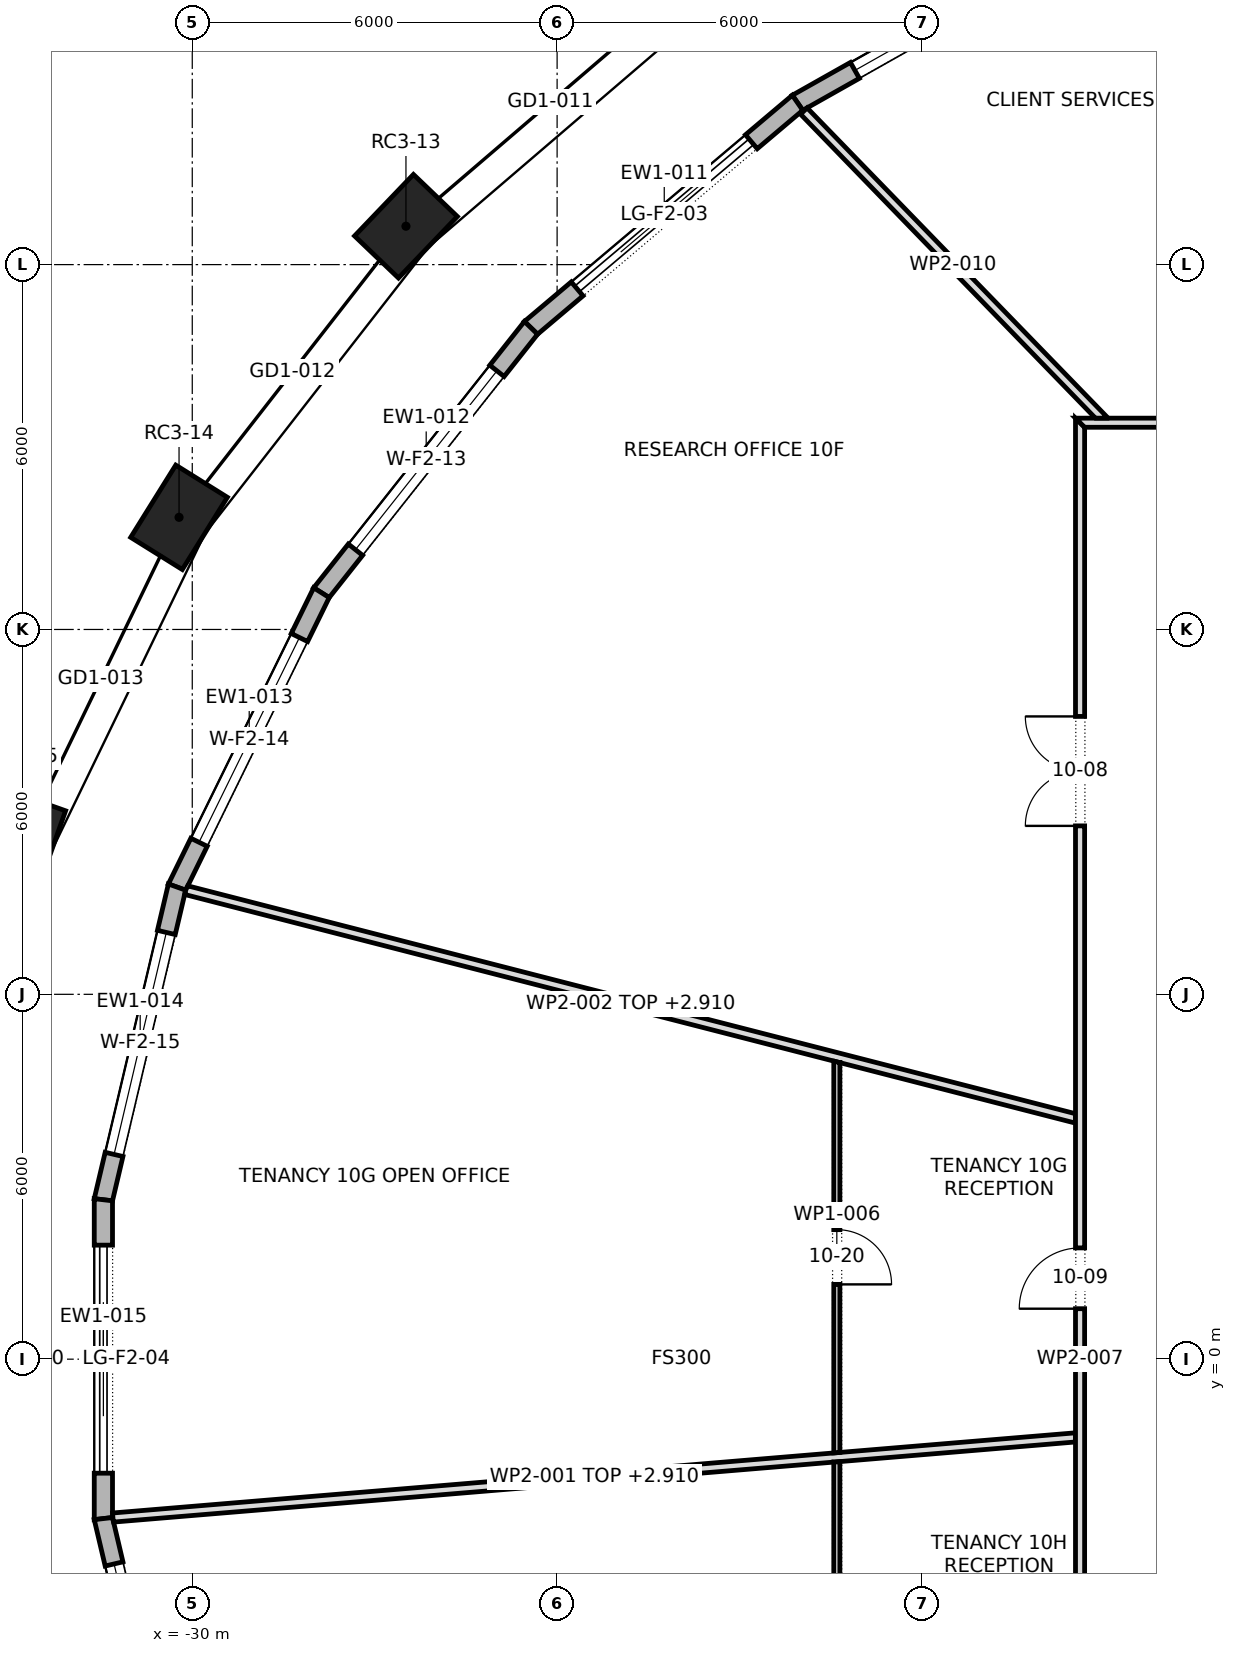
"""IFC4 building model, lengths in metres.
Left out: names, types, materials, properties, quantities, classifications, styles, units other than length and angle.
Written with IfcOpenShell. Run it as: python <this file> out.ifc"""

import sys

from ifc_helpers import new_model, si_unit, direction, frame, frame_2d, origin, origin_2d, place, context, subcontext, project, spatial, polyline, rectangle, outline, extrude, element, fill, save


model = new_model("IFC4")
c1 = context("Model", 3, precision=1e-05, world=origin(), true_north=direction((0.0, 1.0)))
c2 = subcontext(c1, "Body", "Model", "MODEL_VIEW")
j1 = project(units=[si_unit("LENGTHUNIT", "METRE"), si_unit("PLANEANGLEUNIT", "RADIAN")], contexts=[c1])
p1 = place(None, origin())
s1 = spatial("IfcSite", under=j1, at=p1, CompositionType="ELEMENT")
p2 = place(p1, origin())
s2 = spatial("IfcBuilding", under=s1, at=p2, CompositionType="ELEMENT")
p3 = place(p2, frame((0.0, 0.0, 142.3)))
s3 = spatial("IfcBuildingStorey", under=s2, at=p3, CompositionType="ELEMENT", Elevation=142.3)
for number, where, z_axis, x_axis in (
    (1, (-26.486, 18.631, 0.0), (0.0, 0.0, 1.0), (-0.692, -0.722, 0.0)),
    (2, (-30.217, 13.844, 0.0), (0.0, 0.0, 1.0), (-0.529, -0.849, 0.0)),
    (3, (-32.788, 8.525, 0.0), (0.0, 0.0, 1.0), (-0.334, -0.943, 0.0)),
):
    element("IfcColumn", number, at=place(p3, frame(where, z_axis=z_axis, x_axis=x_axis)), inside=s3, PredefinedType="COLUMN", context=c2, shape_type="SweptSolid", body=[
        extrude(rectangle(XDim=1.4, YDim=1.0, at=origin_2d()), origin(), (0.0, 0.0, 1.0), 4.2),
    ])
p4 = place(p3, frame((-14.894, 23.569, 0.0), z_axis=(0.0, 0.0, 1.0), x_axis=(-0.870912346166, -0.491438384028, 0.0)))
e4 = element("IfcWall", 4, at=p4, inside=s3, PredefinedType="STANDARD", context=c2, shape_type="SweptSolid", body=[
    extrude(outline(polyline([(-0.013, -0.15), (5.93, -0.15), (5.902, 0.15), (0.013, 0.15), (-0.013, -0.15)])), origin(), (0.0, 0.0, 1.0), 3.9),
])
p5 = place(p4, frame((1.083, 0.0, 0.6)))
e5 = element("IfcOpeningElement", 5, at=p5, cuts=e4, PredefinedType="OPENING", context=c2, shape_type="SweptSolid", body=[
    extrude(rectangle(XDim=3.75, YDim=2.85, at=frame_2d((1.875, 1.425))), frame((0.0, 0.162, 0.0), z_axis=(0.0, -1.0, 0.0), x_axis=(1.0, 0.0, 0.0)), (0.0, 0.0, 1.0), 0.324),
])
p6 = place(p3, frame((-20.046, 20.661, 0.0), z_axis=(0.0, 0.0, 1.0), x_axis=(-0.764047627809, -0.64515984255, 0.0)))
e6 = element("IfcWall", 6, at=p6, inside=s3, PredefinedType="STANDARD", context=c2, shape_type="SweptSolid", body=[
    extrude(outline(polyline([(-0.014, -0.15), (5.753, -0.15), (5.722, 0.15), (0.014, 0.15), (-0.014, -0.15)])), origin(), (0.0, 0.0, 1.0), 3.9),
])
p7 = place(p6, frame((0.994, 0.0, 0.0)))
e7 = element("IfcOpeningElement", 7, at=p7, cuts=e6, PredefinedType="OPENING", context=c2, shape_type="SweptSolid", body=[
    extrude(rectangle(XDim=3.75, YDim=3.45, at=frame_2d((1.875, 1.725))), frame((0.0, 0.162, 0.0), z_axis=(0.0, -1.0, 0.0), x_axis=(1.0, 0.0, 0.0)), (0.0, 0.0, 1.0), 0.324),
])
p8 = place(p3, frame((-24.43, 16.96, 0.0), z_axis=(0.0, 0.0, 1.0), x_axis=(-0.620520511988, -0.784190215574, 0.0)))
e8 = element("IfcWall", 8, at=p8, inside=s3, PredefinedType="STANDARD", context=c2, shape_type="SweptSolid", body=[
    extrude(outline(polyline([(-0.015, -0.15), (5.57, -0.15), (5.537, 0.15), (0.015, 0.15), (-0.015, -0.15)])), origin(), (0.0, 0.0, 1.0), 3.9),
])
p9 = place(p8, frame((0.902, 0.0, 0.6)))
e9 = element("IfcOpeningElement", 9, at=p9, cuts=e8, PredefinedType="OPENING", context=c2, shape_type="SweptSolid", body=[
    extrude(rectangle(XDim=3.75, YDim=2.85, at=frame_2d((1.875, 1.425))), frame((0.0, 0.162, 0.0), z_axis=(0.0, -1.0, 0.0), x_axis=(1.0, 0.0, 0.0)), (0.0, 0.0, 1.0), 0.324),
])
p10 = place(p3, frame((-27.876, 12.605, 0.0), z_axis=(0.0, 0.0, 1.0), x_axis=(-0.440373354088, -0.897814740918, 0.0)))
e10 = element("IfcWall", 10, at=p10, inside=s3, PredefinedType="STANDARD", context=c2, shape_type="SweptSolid", body=[
    extrude(outline(polyline([(-0.016, -0.15), (5.409, -0.15), (5.376, 0.15), (0.016, 0.15), (-0.016, -0.15)])), origin(), (0.0, 0.0, 1.0), 3.9),
])
p11 = place(p10, frame((0.821, 0.0, 0.6)))
e11 = element("IfcOpeningElement", 11, at=p11, cuts=e10, PredefinedType="OPENING", context=c2, shape_type="SweptSolid", body=[
    extrude(rectangle(XDim=3.75, YDim=2.85, at=frame_2d((1.875, 1.425))), frame((0.0, 0.162, 0.0), z_axis=(0.0, -1.0, 0.0), x_axis=(1.0, 0.0, 0.0)), (0.0, 0.0, 1.0), 0.324),
])
p12 = place(p3, frame((-30.25, 7.763, 0.0), z_axis=(0.0, 0.0, 1.0), x_axis=(-0.229289208312, -0.973358340464, 0.0)))
e12 = element("IfcWall", 12, at=p12, inside=s3, PredefinedType="STANDARD", context=c2, shape_type="SweptSolid", body=[
    extrude(outline(polyline([(-0.017, -0.15), (5.3, -0.15), (5.265, 0.15), (0.017, 0.15), (-0.017, -0.15)])), origin(), (0.0, 0.0, 1.0), 3.9),
])
p13 = place(p12, frame((0.766, 0.0, 0.6)))
e13 = element("IfcOpeningElement", 13, at=p13, cuts=e12, PredefinedType="OPENING", context=c2, shape_type="SweptSolid", body=[
    extrude(rectangle(XDim=3.75, YDim=2.85, at=frame_2d((1.875, 1.425))), frame((0.0, 0.162, 0.0), z_axis=(0.0, -1.0, 0.0), x_axis=(1.0, 0.0, 0.0)), (0.0, 0.0, 1.0), 0.324),
])
p14 = place(p3, frame((-31.462, 2.622, 0.0), z_axis=(0.0, 0.0, 1.0), x_axis=(0.0, -1.0, 0.0)))
e14 = element("IfcWall", 14, at=p14, inside=s3, PredefinedType="STANDARD", context=c2, shape_type="SweptSolid", body=[
    extrude(outline(polyline([(-0.017, -0.15), (5.26, -0.15), (5.226, 0.15), (0.017, 0.15), (-0.017, -0.15)])), origin(), (0.0, 0.0, 1.0), 3.9),
])
p15 = place(p14, frame((0.747, 0.0, 0.0)))
e15 = element("IfcOpeningElement", 15, at=p15, cuts=e14, PredefinedType="OPENING", context=c2, shape_type="SweptSolid", body=[
    extrude(rectangle(XDim=3.75, YDim=3.45, at=frame_2d((1.875, 1.725))), frame((0.0, 0.162, 0.0), z_axis=(0.0, -1.0, 0.0), x_axis=(1.0, 0.0, 0.0)), (0.0, 0.0, 1.0), 0.324),
])
p16 = place(p3, frame((-31.462, -2.622, 0.0), z_axis=(0.0, 0.0, 1.0), x_axis=(0.229289208312, -0.973358340464, 0.0)))
e16 = element("IfcWall", 16, at=p16, inside=s3, PredefinedType="STANDARD", context=c2, shape_type="SweptSolid", body=[
    extrude(outline(polyline([(-0.017, -0.15), (5.299, -0.15), (5.265, 0.15), (0.017, 0.15), (-0.017, -0.15)])), origin(), (0.0, 0.0, 1.0), 3.9),
])
p17 = place(p16, frame((0.766, 0.0, 0.6)))
e17 = element("IfcOpeningElement", 17, at=p17, cuts=e16, PredefinedType="OPENING", context=c2, shape_type="SweptSolid", body=[
    extrude(rectangle(XDim=3.75, YDim=2.85, at=frame_2d((1.875, 1.425))), frame((0.0, 0.162, 0.0), z_axis=(0.0, -1.0, 0.0), x_axis=(1.0, 0.0, 0.0)), (0.0, 0.0, 1.0), 0.324),
])
p18 = place(p3, frame((-31.305, -2.604, 0.0), z_axis=(0.0, 0.0, 1.0), x_axis=(0.996551160003, 0.082980633261, 0.0)))
e18 = element("IfcWall", 18, at=p18, inside=s3, PredefinedType="PARTITIONING", context=c2, shape_type="SweptSolid", body=[
    extrude(outline(polyline([(0.005, -0.075), (1.985, -0.075), (3.966, -0.075), (5.947, -0.075), (7.928, -0.075), (9.909, -0.075), (11.89, -0.075), (11.89, -0.075), (11.891, -0.075), (13.885, -0.075), (15.878, -0.075), (15.89, 0.068), (15.89, 0.075), (13.904, 0.075), (11.918, 0.075), (9.931, 0.075), (7.945, 0.075), (5.959, 0.075), (3.973, 0.075), (1.986, 0.075), (0.0, 0.075), (0.0, -0.044), (0.005, -0.075)])), origin(), (0.0, 0.0, 1.0), 2.91),
])
p19 = place(p3, frame((-30.106, 7.715, 0.0), z_axis=(0.0, 0.0, 1.0), x_axis=(0.968604188178, -0.248607977837, 0.0)))
e19 = element("IfcWall", 19, at=p19, inside=s3, PredefinedType="PARTITIONING", context=c2, shape_type="SweptSolid", body=[
    extrude(outline(polyline([(0.0, -0.075), (1.853, -0.075), (3.707, -0.075), (5.56, -0.075), (7.413, -0.075), (9.267, -0.075), (11.12, -0.075), (11.124, -0.074), (11.124, -0.075), (12.458, -0.075), (13.791, -0.075), (15.124, -0.075), (15.124, -0.073), (15.086, 0.075), (13.202, 0.075), (11.318, 0.075), (9.434, 0.075), (7.55, 0.075), (5.667, 0.075), (3.782, 0.075), (1.898, 0.075), (0.015, 0.075), (0.0, 0.005), (0.0, -0.075)])), origin(), (0.0, 0.0, 1.0), 2.91),
])
p20 = place(p3, frame((-19.4, -13.387, 0.0), z_axis=(0.0, 0.0, 1.0), x_axis=(0.0, 1.0, 0.0)))
e20 = element("IfcWall", 20, at=p20, inside=s3, PredefinedType="PARTITIONING", context=c2, shape_type="SweptSolid", body=[
    extrude(outline(polyline([(11.703, -0.05), (11.703, -0.046), (11.695, 0.05), (10.028, 0.05), (8.361, 0.05), (8.354, 0.048), (8.353, 0.05), (6.682, 0.05), (5.012, 0.05), (3.341, 0.05), (1.671, 0.05), (0.0, 0.05), (0.0, 0.05), (0.069, -0.05), (2.008, -0.05), (3.947, -0.05), (5.886, -0.05), (7.825, -0.05), (9.764, -0.05), (11.703, -0.05)])), origin(), (0.0, 0.0, 1.0), 3.9),
])
p21 = place(p20, frame((3.732, 0.0, 0.0)))
e21 = element("IfcOpeningElement", 21, at=p21, cuts=e20, PredefinedType="OPENING", context=c2, shape_type="SweptSolid", body=[
    extrude(rectangle(XDim=0.9, YDim=2.1, at=frame_2d((0.45, 1.05))), frame((0.0, 0.062, 0.0), z_axis=(0.0, -1.0, 0.0), x_axis=(1.0, 0.0, 0.0)), (0.0, 0.0, 1.0), 0.124),
])
p22 = place(p3, frame((-19.4, -1.542, 0.0), z_axis=(0.0, 0.0, 1.0), x_axis=(0.0, 1.0, 0.0)))
e22 = element("IfcWall", 22, at=p22, inside=s3, PredefinedType="PARTITIONING", context=c2, shape_type="SweptSolid", body=[
    extrude(outline(polyline([(0.008, -0.05), (1.611, -0.05), (3.213, -0.05), (4.816, -0.05), (6.418, -0.05), (6.444, 0.05), (4.833, 0.05), (3.222, 0.05), (1.611, 0.05), (0.0, 0.05), (0.0, 0.05), (0.008, -0.05)])), origin(), (0.0, 0.0, 1.0), 3.9),
])
p23 = place(p22, frame((2.772, 0.0, 0.0)))
e23 = element("IfcOpeningElement", 23, at=p23, cuts=e22, PredefinedType="OPENING", context=c2, shape_type="SweptSolid", body=[
    extrude(rectangle(XDim=0.9, YDim=2.1, at=frame_2d((0.45, 1.05))), frame((0.0, 0.062, 0.0), z_axis=(0.0, -1.0, 0.0), x_axis=(1.0, 0.0, 0.0)), (0.0, 0.0, 1.0), 0.124),
])
p24 = place(p3, frame((-15.4, -15.475, 0.0), z_axis=(0.0, 0.0, 1.0), x_axis=(0.0, 1.0, 0.0)))
e24 = element("IfcWall", 24, at=p24, inside=s3, PredefinedType="PARTITIONING", context=c2, shape_type="SweptSolid", body=[
    extrude(outline(polyline([(0.15, -0.075), (2.066, -0.075), (3.981, -0.075), (5.897, -0.075), (7.812, -0.075), (9.728, -0.075), (11.644, -0.075), (13.56, -0.075), (15.475, -0.075), (17.391, -0.075), (19.306, -0.075), (21.222, -0.075), (23.138, -0.075), (25.053, -0.075), (26.969, -0.075), (28.885, -0.075), (30.8, -0.075), (30.95, 0.075), (29.016, 0.075), (27.081, 0.075), (25.147, 0.075), (23.212, 0.075), (21.278, 0.075), (19.344, 0.075), (17.409, 0.075), (15.475, 0.075), (13.541, 0.075), (11.606, 0.075), (9.672, 0.075), (7.738, 0.075), (5.803, 0.075), (3.869, 0.075), (1.935, 0.075), (0.0, 0.075), (0.15, -0.075)])), origin(), (0.0, 0.0, 1.0), 3.9),
])
p25 = place(p24, frame((24.245, 0.0, 0.0)))
e25 = element("IfcOpeningElement", 25, at=p25, cuts=e24, PredefinedType="OPENING", context=c2, shape_type="SweptSolid", body=[
    extrude(rectangle(XDim=1.8, YDim=2.1, at=frame_2d((0.9, 1.05))), frame((0.0, 0.087, 0.0), z_axis=(0.0, -1.0, 0.0), x_axis=(1.0, 0.0, 0.0)), (0.0, 0.0, 1.0), 0.174),
])
p26 = place(p24, frame((16.305, 0.0, 0.0)))
e26 = element("IfcOpeningElement", 26, at=p26, cuts=e24, PredefinedType="OPENING", context=c2, shape_type="SweptSolid", body=[
    extrude(rectangle(XDim=1.0, YDim=2.1, at=frame_2d((0.5, 1.05))), frame((0.0, 0.087, 0.0), z_axis=(0.0, -1.0, 0.0), x_axis=(1.0, 0.0, 0.0)), (0.0, 0.0, 1.0), 0.174),
])
p27 = place(p24, frame((9.0, 0.0, 0.0)))
e27 = element("IfcOpeningElement", 27, at=p27, cuts=e24, PredefinedType="OPENING", context=c2, shape_type="SweptSolid", body=[
    extrude(rectangle(XDim=1.0, YDim=2.1, at=frame_2d((0.5, 1.05))), frame((0.0, 0.087, 0.0), z_axis=(0.0, -1.0, 0.0), x_axis=(1.0, 0.0, 0.0)), (0.0, 0.0, 1.0), 0.174),
])
p28 = place(p3, frame((-15.475, 15.4, 0.0), z_axis=(0.0, 0.0, 1.0), x_axis=(1.0, 0.0, 0.0)))
e28 = element("IfcWall", 28, at=p28, inside=s3, PredefinedType="PARTITIONING", context=c2, shape_type="SweptSolid", body=[
    extrude(outline(polyline([(0.15, -0.075), (2.066, -0.075), (3.981, -0.075), (5.897, -0.075), (7.812, -0.075), (9.728, -0.075), (11.644, -0.075), (13.56, -0.075), (15.475, -0.075), (17.391, -0.075), (19.306, -0.075), (21.222, -0.075), (23.138, -0.075), (25.053, -0.075), (26.969, -0.075), (28.885, -0.075), (30.8, -0.075), (30.95, 0.075), (29.016, 0.075), (27.081, 0.075), (25.147, 0.075), (23.212, 0.075), (21.278, 0.075), (19.344, 0.075), (17.409, 0.075), (15.475, 0.075), (13.541, 0.075), (11.606, 0.075), (9.672, 0.075), (7.738, 0.075), (5.803, 0.075), (3.869, 0.075), (1.935, 0.075), (0.0, 0.075), (0.15, -0.075)])), origin(), (0.0, 0.0, 1.0), 3.9),
])
p29 = place(p28, frame((27.55, 0.0, 0.0)))
e29 = element("IfcOpeningElement", 29, at=p29, cuts=e28, PredefinedType="OPENING", context=c2, shape_type="SweptSolid", body=[
    extrude(rectangle(XDim=1.0, YDim=2.1, at=frame_2d((0.5, 1.05))), frame((0.0, 0.087, 0.0), z_axis=(0.0, -1.0, 0.0), x_axis=(1.0, 0.0, 0.0)), (0.0, 0.0, 1.0), 0.174),
])
p30 = place(p28, frame((20.75, 0.0, 0.0)))
e30 = element("IfcOpeningElement", 30, at=p30, cuts=e28, PredefinedType="OPENING", context=c2, shape_type="SweptSolid", body=[
    extrude(rectangle(XDim=1.0, YDim=2.1, at=frame_2d((0.5, 1.05))), frame((0.0, 0.087, 0.0), z_axis=(0.0, -1.0, 0.0), x_axis=(1.0, 0.0, 0.0)), (0.0, 0.0, 1.0), 0.174),
])
p31 = place(p28, frame((13.11, 0.0, 0.0)))
e31 = element("IfcOpeningElement", 31, at=p31, cuts=e28, PredefinedType="OPENING", context=c2, shape_type="SweptSolid", body=[
    extrude(rectangle(XDim=1.0, YDim=2.1, at=frame_2d((0.5, 1.05))), frame((0.0, 0.087, 0.0), z_axis=(0.0, -1.0, 0.0), x_axis=(1.0, 0.0, 0.0)), (0.0, 0.0, 1.0), 0.174),
])
p32 = place(p28, frame((4.725, 0.0, 0.0)))
e32 = element("IfcOpeningElement", 32, at=p32, cuts=e28, PredefinedType="OPENING", context=c2, shape_type="SweptSolid", body=[
    extrude(rectangle(XDim=1.0, YDim=2.1, at=frame_2d((0.5, 1.05))), frame((0.0, 0.087, 0.0), z_axis=(0.0, -1.0, 0.0), x_axis=(1.0, 0.0, 0.0)), (0.0, 0.0, 1.0), 0.174),
])
p33 = place(p3, frame((-14.992, 15.423, 0.0), z_axis=(0.0, 0.0, 1.0), x_axis=(-0.696328171708, 0.717723538199, 0.0)))
e33 = element("IfcWall", 33, at=p33, inside=s3, PredefinedType="PARTITIONING", context=c2, shape_type="SweptSolid", body=[
    extrude(outline(polyline([(7.109, 0.075), (5.368, 0.075), (3.627, 0.075), (1.886, 0.075), (0.145, 0.075), (0.0, -0.074), (0.0, -0.075), (1.777, -0.075), (3.554, -0.075), (5.332, -0.075), (7.109, -0.075), (7.109, 0.075)])), origin(), (0.0, 0.0, 1.0), 3.9),
])
p34 = place(p5, origin())
e34 = element("IfcWindow", 34, at=p34, inside=s3, PartitioningType="TRIPLE_PANEL_VERTICAL", PredefinedType="WINDOW", context=c2, shape_type="SweptSolid", body=[
    extrude(rectangle(XDim=3.75, YDim=2.85, at=frame_2d((1.875, 1.425))), frame((0.0, 0.03, 0.0), z_axis=(0.0, -1.0, 0.0), x_axis=(1.0, 0.0, 0.0)), (0.0, 0.0, 1.0), 0.06),
])
fill(e5, e34)
p35 = place(p7, origin())
e35 = element("IfcDoor", 35, at=p35, inside=s3, OperationType="DOUBLE_DOOR_SLIDING", PredefinedType="DOOR", context=c2, shape_type="SweptSolid", body=[
    extrude(rectangle(XDim=3.75, YDim=3.45, at=frame_2d((1.875, 1.725))), frame((0.0, 0.025, 0.0), z_axis=(0.0, -1.0, 0.0), x_axis=(1.0, 0.0, 0.0)), (0.0, 0.0, 1.0), 0.05),
])
fill(e7, e35)
p36 = place(p9, origin())
e36 = element("IfcWindow", 36, at=p36, inside=s3, PartitioningType="TRIPLE_PANEL_VERTICAL", PredefinedType="WINDOW", context=c2, shape_type="SweptSolid", body=[
    extrude(rectangle(XDim=3.75, YDim=2.85, at=frame_2d((1.875, 1.425))), frame((0.0, 0.03, 0.0), z_axis=(0.0, -1.0, 0.0), x_axis=(1.0, 0.0, 0.0)), (0.0, 0.0, 1.0), 0.06),
])
fill(e9, e36)
p37 = place(p11, origin())
e37 = element("IfcWindow", 37, at=p37, inside=s3, PartitioningType="TRIPLE_PANEL_VERTICAL", PredefinedType="WINDOW", context=c2, shape_type="SweptSolid", body=[
    extrude(rectangle(XDim=3.75, YDim=2.85, at=frame_2d((1.875, 1.425))), frame((0.0, 0.03, 0.0), z_axis=(0.0, -1.0, 0.0), x_axis=(1.0, 0.0, 0.0)), (0.0, 0.0, 1.0), 0.06),
])
fill(e11, e37)
p38 = place(p13, origin())
e38 = element("IfcWindow", 38, at=p38, inside=s3, PartitioningType="TRIPLE_PANEL_VERTICAL", PredefinedType="WINDOW", context=c2, shape_type="SweptSolid", body=[
    extrude(rectangle(XDim=3.75, YDim=2.85, at=frame_2d((1.875, 1.425))), frame((0.0, 0.03, 0.0), z_axis=(0.0, -1.0, 0.0), x_axis=(1.0, 0.0, 0.0)), (0.0, 0.0, 1.0), 0.06),
])
fill(e13, e38)
p39 = place(p15, origin())
e39 = element("IfcDoor", 39, at=p39, inside=s3, OperationType="DOUBLE_DOOR_SLIDING", PredefinedType="DOOR", context=c2, shape_type="SweptSolid", body=[
    extrude(rectangle(XDim=3.75, YDim=3.45, at=frame_2d((1.875, 1.725))), frame((0.0, 0.025, 0.0), z_axis=(0.0, -1.0, 0.0), x_axis=(1.0, 0.0, 0.0)), (0.0, 0.0, 1.0), 0.05),
])
fill(e15, e39)
p40 = place(p17, origin())
e40 = element("IfcWindow", 40, at=p40, inside=s3, PartitioningType="TRIPLE_PANEL_VERTICAL", PredefinedType="WINDOW", context=c2, shape_type="SweptSolid", body=[
    extrude(rectangle(XDim=3.75, YDim=2.85, at=frame_2d((1.875, 1.425))), frame((0.0, 0.03, 0.0), z_axis=(0.0, -1.0, 0.0), x_axis=(1.0, 0.0, 0.0)), (0.0, 0.0, 1.0), 0.06),
])
fill(e17, e40)
p41 = place(p25, origin())
e41 = element("IfcDoor", 41, at=p41, inside=s3, OperationType="DOUBLE_DOOR_SINGLE_SWING", PredefinedType="DOOR", context=c2, shape_type="SweptSolid", body=[
    extrude(rectangle(XDim=1.8, YDim=2.1, at=frame_2d((0.9, 1.05))), frame((0.0, 0.025, 0.0), z_axis=(0.0, -1.0, 0.0), x_axis=(1.0, 0.0, 0.0)), (0.0, 0.0, 1.0), 0.05),
])
fill(e25, e41)
p42 = place(p26, origin())
e42 = element("IfcDoor", 42, at=p42, inside=s3, OperationType="SINGLE_SWING_RIGHT", PredefinedType="DOOR", context=c2, shape_type="SweptSolid", body=[
    extrude(rectangle(XDim=1.0, YDim=2.1, at=frame_2d((0.5, 1.05))), frame((0.0, 0.025, 0.0), z_axis=(0.0, -1.0, 0.0), x_axis=(1.0, 0.0, 0.0)), (0.0, 0.0, 1.0), 0.05),
])
fill(e26, e42)
p43 = place(p23, frame((0.9, 0.0, 0.0), z_axis=(0.0, 0.0, 1.0), x_axis=(-1.0, 0.0, 0.0)))
e43 = element("IfcDoor", 43, at=p43, inside=s3, OperationType="SINGLE_SWING_LEFT", PredefinedType="DOOR", context=c2, shape_type="SweptSolid", body=[
    extrude(rectangle(XDim=0.9, YDim=2.1, at=frame_2d((0.45, 1.05))), frame((0.0, 0.025, 0.0), z_axis=(0.0, -1.0, 0.0), x_axis=(1.0, 0.0, 0.0)), (0.0, 0.0, 1.0), 0.05),
])
fill(e23, e43)
save(model, sys.argv[1])
